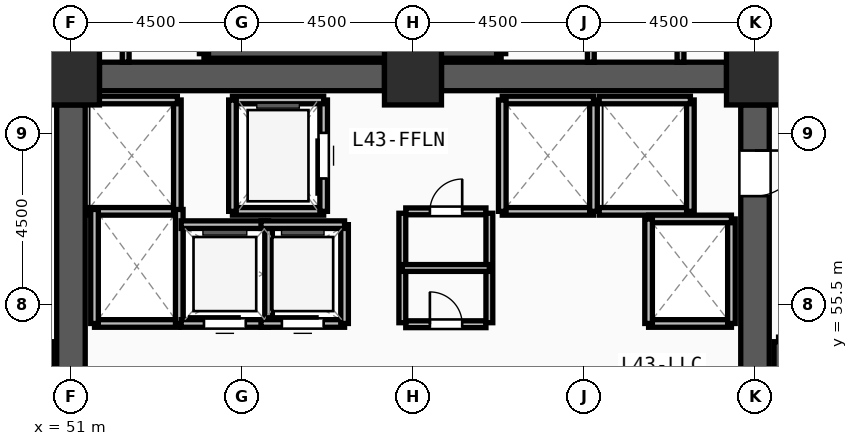
"""IFC4 building model, lengths in metres.
Left out: names, types, materials, properties, quantities, classifications, styles, units other than length and angle.
Written with IfcOpenShell. Run it as: python <this file> out.ifc"""

import sys

from ifc_helpers import new_model, si_unit, direction, frame, frame_2d, origin, origin_2d, place, context, subcontext, project, spatial, rectangle, extrude, source, transform, mapped, element, fill, save


model = new_model("IFC4")
c1 = context("Model", 3, precision=1e-05, world=origin(), true_north=direction((0.0, 1.0)))
c2 = subcontext(c1, "Body", "Model", "MODEL_VIEW")
j1 = project(units=[si_unit("LENGTHUNIT", "METRE"), si_unit("PLANEANGLEUNIT", "RADIAN")], contexts=[c1])
p1 = place(None, origin())
s1 = spatial("IfcSite", under=j1, at=p1, CompositionType="ELEMENT")
p2 = place(p1, origin())
s2 = spatial("IfcBuilding", under=s1, at=p2, CompositionType="ELEMENT")
p3 = place(p2, frame((0.0, 0.0, 166.5)))
s3 = spatial("IfcBuildingStorey", under=s2, at=p3, CompositionType="ELEMENT", Elevation=166.5)
m1 = source(origin(), c2, "Body", "SweptSolid", [
    extrude(rectangle(XDim=1.5, YDim=1.5, at=origin_2d()), origin(), (0.0, 0.0, 1.0), 3.75),
])
for number, where, z_axis, x_axis in (
    (1, (69.0, 61.5, 0.0), (0.0, 0.0, 1.0), (1.0, 0.0, 0.0)),
    (2, (60.0, 61.5, 0.0), (0.0, 0.0, 1.0), (1.0, 0.0, 0.0)),
    (3, (51.0, 61.5, 0.0), (0.0, 0.0, 1.0), (1.0, 0.0, 0.0)),
):
    element("IfcColumn", number, at=place(p3, frame(where, z_axis=z_axis, x_axis=x_axis)), inside=s3, PredefinedType="COLUMN", context=c2, shape_type="MappedRepresentation", body=[
        mapped(m1, transform((0.0, 0.0, 0.0), x_axis=(1.0, 0.0, 0.0), y_axis=(0.0, 1.0, 0.0), z_axis=(0.0, 0.0, 1.0), scale=1.0)),
    ])
for number, where, z_axis, x_axis in (
    (4, (51.75, 61.5, 0.0), (0.0, 0.0, 1.0), (1.0, 0.0, 0.0)),
    (5, (60.75, 61.5, 0.0), (0.0, 0.0, 1.0), (1.0, 0.0, 0.0)),
):
    element("IfcWall", number, at=place(p3, frame(where, z_axis=z_axis, x_axis=x_axis)), inside=s3, PredefinedType="SHEAR", context=c2, shape_type="SweptSolid", body=[
        extrude(rectangle(XDim=7.5, YDim=0.75, at=frame_2d((3.75, 0.0))), origin(), (0.0, 0.0, 1.0), 3.57),
    ])
p4 = place(p3, frame((69.0, 60.75, 0.0), z_axis=(0.0, 0.0, 1.0), x_axis=(0.0, -1.0, 0.0)))
e6 = element("IfcWall", 6, at=p4, inside=s3, PredefinedType="SHEAR", context=c2, shape_type="SweptSolid", body=[
    extrude(rectangle(XDim=13.5, YDim=0.75, at=frame_2d((6.75, 0.0))), origin(), (0.0, 0.0, 1.0), 3.57),
])
m2 = source(origin(), c2, "Body", "SweptSolid", [
    extrude(rectangle(XDim=1.2, YDim=2.2, at=frame_2d((0.6, 1.1))), frame((0.0, 0.385, 0.0), z_axis=(0.0, -1.0, 0.0), x_axis=(1.0, 0.0, 0.0)), (0.0, 0.0, 1.0), 0.77),
])
p5 = place(p4, frame((1.2, 0.0, 0.0)))
e7 = element("IfcOpeningElement", 7, at=p5, cuts=e6, PredefinedType="OPENING", context=c2, shape_type="MappedRepresentation", body=[
    mapped(m2, transform((0.0, 0.0, 0.0), x_axis=(1.0, 0.0, 0.0), y_axis=(0.0, 1.0, 0.0), z_axis=(0.0, 0.0, 1.0), scale=1.0)),
])
p6 = place(p3, frame((51.0, 47.25, 0.0), z_axis=(0.0, 0.0, 1.0), x_axis=(0.0, 1.0, 0.0)))
e8 = element("IfcWall", 8, at=p6, inside=s3, PredefinedType="SHEAR", context=c2, shape_type="SweptSolid", body=[
    extrude(rectangle(XDim=13.5, YDim=0.75, at=frame_2d((6.75, 0.0))), origin(), (0.0, 0.0, 1.0), 3.57),
])
for number, where, z_axis, x_axis in (
    (9, (69.62, 54.52, 0.0), (0.0, 0.0, 1.0), (0.0, -1.0, 0.0)),
    (10, (54.5, 62.1, 0.0), (0.0, 0.0, 1.0), (1.0, 0.0, 0.0)),
):
    element("IfcWall", number, at=place(p3, frame(where, z_axis=z_axis, x_axis=x_axis)), inside=s3, PredefinedType="SOLIDWALL", context=c2, shape_type="SweptSolid", body=[
        extrude(rectangle(XDim=7.82, YDim=0.24, at=frame_2d((3.91, 0.0))), origin(), (0.0, 0.0, 1.0), 3.57),
    ])
for number, where, z_axis, x_axis in (
    (11, (62.32, 62.1, 0.0), (0.0, 0.0, 1.0), (0.0, 1.0, 0.0)),
    (12, (54.5, 65.54, 0.0), (0.0, 0.0, 1.0), (0.0, -1.0, 0.0)),
):
    element("IfcWall", number, at=place(p3, frame(where, z_axis=z_axis, x_axis=x_axis)), inside=s3, PredefinedType="SOLIDWALL", context=c2, shape_type="SweptSolid", body=[
        extrude(rectangle(XDim=3.44, YDim=0.24, at=frame_2d((1.72, 0.0))), origin(), (0.0, 0.0, 1.0), 3.57),
    ])
p7 = place(p3, frame((55.25, 57.95, 0.0), z_axis=(0.0, 0.0, 1.0), x_axis=(1.0, 0.0, 0.0)))
e13 = element("IfcWall", 13, at=p7, inside=s3, PredefinedType="SOLIDWALL", context=c2, shape_type="SweptSolid", body=[
    extrude(rectangle(XDim=2.4, YDim=0.2, at=frame_2d((1.2, 0.0))), origin(), (0.0, 0.0, 1.0), 3.57),
])
p8 = place(p3, frame((57.65, 57.95, 0.0), z_axis=(0.0, 0.0, 1.0), x_axis=(0.0, 1.0, 0.0)))
e14 = element("IfcWall", 14, at=p8, inside=s3, PredefinedType="SOLIDWALL", context=c2, shape_type="SweptSolid", body=[
    extrude(rectangle(XDim=2.93, YDim=0.2, at=frame_2d((1.465, 0.0))), origin(), (0.0, 0.0, 1.0), 3.57),
])
m3 = source(origin(), c2, "Body", "SweptSolid", [
    extrude(rectangle(XDim=1.2, YDim=2.3, at=frame_2d((0.6, 1.15))), frame((0.0, 0.11, 0.0), z_axis=(0.0, -1.0, 0.0), x_axis=(1.0, 0.0, 0.0)), (0.0, 0.0, 1.0), 0.22),
])
p9 = place(p8, frame((0.865, 0.0, 0.0)))
e15 = element("IfcOpeningElement", 15, at=p9, cuts=e14, PredefinedType="OPENING", context=c2, shape_type="MappedRepresentation", body=[
    mapped(m3, transform((0.0, 0.0, 0.0), x_axis=(1.0, 0.0, 0.0), y_axis=(0.0, 1.0, 0.0), z_axis=(0.0, 0.0, 1.0), scale=1.0)),
])
p10 = place(p3, frame((57.65, 60.88, 0.0), z_axis=(0.0, 0.0, 1.0), x_axis=(-1.0, 0.0, 0.0)))
e16 = element("IfcWall", 16, at=p10, inside=s3, PredefinedType="SOLIDWALL", context=c2, shape_type="SweptSolid", body=[
    extrude(rectangle(XDim=2.4, YDim=0.2, at=frame_2d((1.2, 0.0))), origin(), (0.0, 0.0, 1.0), 3.57),
])
p11 = place(p3, frame((55.25, 60.88, 0.0), z_axis=(0.0, 0.0, 1.0), x_axis=(0.0, -1.0, 0.0)))
e17 = element("IfcWall", 17, at=p11, inside=s3, PredefinedType="SOLIDWALL", context=c2, shape_type="SweptSolid", body=[
    extrude(rectangle(XDim=2.93, YDim=0.2, at=frame_2d((1.465, 0.0))), origin(), (0.0, 0.0, 1.0), 3.57),
])
p12 = place(p3, frame((62.35, 57.95, 0.0), z_axis=(0.0, 0.0, 1.0), x_axis=(1.0, 0.0, 0.0)))
e18 = element("IfcWall", 18, at=p12, inside=s3, PredefinedType="SOLIDWALL", context=c2, shape_type="SweptSolid", body=[
    extrude(rectangle(XDim=2.4, YDim=0.2, at=frame_2d((1.2, 0.0))), origin(), (0.0, 0.0, 1.0), 3.57),
])
p13 = place(p3, frame((64.75, 57.95, 0.0), z_axis=(0.0, 0.0, 1.0), x_axis=(0.0, 1.0, 0.0)))
e19 = element("IfcWall", 19, at=p13, inside=s3, PredefinedType="SOLIDWALL", context=c2, shape_type="SweptSolid", body=[
    extrude(rectangle(XDim=2.93, YDim=0.2, at=frame_2d((1.465, 0.0))), origin(), (0.0, 0.0, 1.0), 3.57),
])
p14 = place(p3, frame((64.75, 60.88, 0.0), z_axis=(0.0, 0.0, 1.0), x_axis=(-1.0, 0.0, 0.0)))
e20 = element("IfcWall", 20, at=p14, inside=s3, PredefinedType="SOLIDWALL", context=c2, shape_type="SweptSolid", body=[
    extrude(rectangle(XDim=2.4, YDim=0.2, at=frame_2d((1.2, 0.0))), origin(), (0.0, 0.0, 1.0), 3.57),
])
p15 = place(p3, frame((62.35, 60.88, 0.0), z_axis=(0.0, 0.0, 1.0), x_axis=(0.0, -1.0, 0.0)))
e21 = element("IfcWall", 21, at=p15, inside=s3, PredefinedType="SOLIDWALL", context=c2, shape_type="SweptSolid", body=[
    extrude(rectangle(XDim=2.93, YDim=0.2, at=frame_2d((1.465, 0.0))), origin(), (0.0, 0.0, 1.0), 3.57),
])
p16 = place(p3, frame((64.9, 57.95, 0.0), z_axis=(0.0, 0.0, 1.0), x_axis=(1.0, 0.0, 0.0)))
e22 = element("IfcWall", 22, at=p16, inside=s3, PredefinedType="SOLIDWALL", context=c2, shape_type="SweptSolid", body=[
    extrude(rectangle(XDim=2.4, YDim=0.2, at=frame_2d((1.2, 0.0))), origin(), (0.0, 0.0, 1.0), 3.57),
])
p17 = place(p3, frame((67.3, 57.95, 0.0), z_axis=(0.0, 0.0, 1.0), x_axis=(0.0, 1.0, 0.0)))
e23 = element("IfcWall", 23, at=p17, inside=s3, PredefinedType="SOLIDWALL", context=c2, shape_type="SweptSolid", body=[
    extrude(rectangle(XDim=2.93, YDim=0.2, at=frame_2d((1.465, 0.0))), origin(), (0.0, 0.0, 1.0), 3.57),
])
for number, where, z_axis, x_axis in (
    (24, (67.3, 60.88, 0.0), (0.0, 0.0, 1.0), (-1.0, 0.0, 0.0)),
    (25, (51.4, 57.95, 0.0), (0.0, 0.0, 1.0), (1.0, 0.0, 0.0)),
):
    element("IfcWall", number, at=place(p3, frame(where, z_axis=z_axis, x_axis=x_axis)), inside=s3, PredefinedType="SOLIDWALL", context=c2, shape_type="SweptSolid", body=[
        extrude(rectangle(XDim=2.4, YDim=0.2, at=frame_2d((1.2, 0.0))), origin(), (0.0, 0.0, 1.0), 3.57),
    ])
p18 = place(p3, frame((53.8, 57.95, 0.0), z_axis=(0.0, 0.0, 1.0), x_axis=(0.0, 1.0, 0.0)))
e26 = element("IfcWall", 26, at=p18, inside=s3, PredefinedType="SOLIDWALL", context=c2, shape_type="SweptSolid", body=[
    extrude(rectangle(XDim=2.93, YDim=0.2, at=frame_2d((1.465, 0.0))), origin(), (0.0, 0.0, 1.0), 3.57),
])
p19 = place(p3, frame((53.8, 60.88, 0.0), z_axis=(0.0, 0.0, 1.0), x_axis=(-1.0, 0.0, 0.0)))
e27 = element("IfcWall", 27, at=p19, inside=s3, PredefinedType="SOLIDWALL", context=c2, shape_type="SweptSolid", body=[
    extrude(rectangle(XDim=2.4, YDim=0.2, at=frame_2d((1.2, 0.0))), origin(), (0.0, 0.0, 1.0), 3.57),
])
p20 = place(p3, frame((51.62, 55.0, 0.0), z_axis=(0.0, 0.0, 1.0), x_axis=(1.0, 0.0, 0.0)))
e28 = element("IfcWall", 28, at=p20, inside=s3, PredefinedType="SOLIDWALL", context=c2, shape_type="SweptSolid", body=[
    extrude(rectangle(XDim=2.23, YDim=0.2, at=frame_2d((1.115, 0.0))), origin(), (0.0, 0.0, 1.0), 3.57),
])
for number, where, z_axis, x_axis in (
    (29, (53.85, 55.0, 0.0), (0.0, 0.0, 1.0), (0.0, 1.0, 0.0)),
    (30, (51.62, 58.0, 0.0), (0.0, 0.0, 1.0), (0.0, -1.0, 0.0)),
):
    element("IfcWall", number, at=place(p3, frame(where, z_axis=z_axis, x_axis=x_axis)), inside=s3, PredefinedType="SOLIDWALL", context=c2, shape_type="SweptSolid", body=[
        extrude(rectangle(XDim=3.0, YDim=0.2, at=frame_2d((1.5, 0.0))), origin(), (0.0, 0.0, 1.0), 3.57),
    ])
p21 = place(p3, frame((66.2, 55.0, 0.0), z_axis=(0.0, 0.0, 1.0), x_axis=(1.0, 0.0, 0.0)))
e31 = element("IfcWall", 31, at=p21, inside=s3, PredefinedType="SOLIDWALL", context=c2, shape_type="SweptSolid", body=[
    extrude(rectangle(XDim=2.18, YDim=0.2, at=frame_2d((1.09, 0.0))), origin(), (0.0, 0.0, 1.0), 3.57),
])
p22 = place(p3, frame((68.38, 55.0, 0.0), z_axis=(0.0, 0.0, 1.0), x_axis=(0.0, 1.0, 0.0)))
e32 = element("IfcWall", 32, at=p22, inside=s3, PredefinedType="SOLIDWALL", context=c2, shape_type="SweptSolid", body=[
    extrude(rectangle(XDim=2.75, YDim=0.2, at=frame_2d((1.375, 0.0))), origin(), (0.0, 0.0, 1.0), 3.57),
])
p23 = place(p3, frame((68.38, 57.75, 0.0), z_axis=(0.0, 0.0, 1.0), x_axis=(-1.0, 0.0, 0.0)))
e33 = element("IfcWall", 33, at=p23, inside=s3, PredefinedType="SOLIDWALL", context=c2, shape_type="SweptSolid", body=[
    extrude(rectangle(XDim=2.18, YDim=0.2, at=frame_2d((1.09, 0.0))), origin(), (0.0, 0.0, 1.0), 3.57),
])
p24 = place(p3, frame((66.2, 57.75, 0.0), z_axis=(0.0, 0.0, 1.0), x_axis=(0.0, -1.0, 0.0)))
e34 = element("IfcWall", 34, at=p24, inside=s3, PredefinedType="SOLIDWALL", context=c2, shape_type="SweptSolid", body=[
    extrude(rectangle(XDim=2.75, YDim=0.2, at=frame_2d((1.375, 0.0))), origin(), (0.0, 0.0, 1.0), 3.57),
])
p25 = place(p3, frame((53.9, 55.0, 0.0), z_axis=(0.0, 0.0, 1.0), x_axis=(1.0, 0.0, 0.0)))
e35 = element("IfcWall", 35, at=p25, inside=s3, PredefinedType="SOLIDWALL", context=c2, shape_type="SweptSolid", body=[
    extrude(rectangle(XDim=2.3, YDim=0.2, at=frame_2d((1.15, 0.0))), origin(), (0.0, 0.0, 1.0), 3.57),
])
m4 = source(origin(), c2, "Body", "SweptSolid", [
    extrude(rectangle(XDim=1.1, YDim=2.2, at=frame_2d((0.55, 1.1))), frame((0.0, 0.11, 0.0), z_axis=(0.0, -1.0, 0.0), x_axis=(1.0, 0.0, 0.0)), (0.0, 0.0, 1.0), 0.22),
])
p26 = place(p25, frame((0.6, 0.0, 0.0)))
e36 = element("IfcOpeningElement", 36, at=p26, cuts=e35, PredefinedType="OPENING", context=c2, shape_type="MappedRepresentation", body=[
    mapped(m4, transform((0.0, 0.0, 0.0), x_axis=(1.0, 0.0, 0.0), y_axis=(0.0, 1.0, 0.0), z_axis=(0.0, 0.0, 1.0), scale=1.0)),
])
p27 = place(p3, frame((56.2, 55.0, 0.0), z_axis=(0.0, 0.0, 1.0), x_axis=(0.0, 1.0, 0.0)))
e37 = element("IfcWall", 37, at=p27, inside=s3, PredefinedType="SOLIDWALL", context=c2, shape_type="SweptSolid", body=[
    extrude(rectangle(XDim=2.6, YDim=0.2, at=frame_2d((1.3, 0.0))), origin(), (0.0, 0.0, 1.0), 3.57),
])
p28 = place(p3, frame((56.2, 57.6, 0.0), z_axis=(0.0, 0.0, 1.0), x_axis=(-1.0, 0.0, 0.0)))
e38 = element("IfcWall", 38, at=p28, inside=s3, PredefinedType="SOLIDWALL", context=c2, shape_type="SweptSolid", body=[
    extrude(rectangle(XDim=2.3, YDim=0.2, at=frame_2d((1.15, 0.0))), origin(), (0.0, 0.0, 1.0), 3.57),
])
p29 = place(p3, frame((56.0, 55.0, 0.0), z_axis=(0.0, 0.0, 1.0), x_axis=(1.0, 0.0, 0.0)))
e39 = element("IfcWall", 39, at=p29, inside=s3, PredefinedType="SOLIDWALL", context=c2, shape_type="SweptSolid", body=[
    extrude(rectangle(XDim=2.2, YDim=0.2, at=frame_2d((1.1, 0.0))), origin(), (0.0, 0.0, 1.0), 3.57),
])
p30 = place(p29, frame((0.55, 0.0, 0.0)))
e40 = element("IfcOpeningElement", 40, at=p30, cuts=e39, PredefinedType="OPENING", context=c2, shape_type="MappedRepresentation", body=[
    mapped(m4, transform((0.0, 0.0, 0.0), x_axis=(1.0, 0.0, 0.0), y_axis=(0.0, 1.0, 0.0), z_axis=(0.0, 0.0, 1.0), scale=1.0)),
])
p31 = place(p3, frame((58.2, 55.0, 0.0), z_axis=(0.0, 0.0, 1.0), x_axis=(0.0, 1.0, 0.0)))
e41 = element("IfcWall", 41, at=p31, inside=s3, PredefinedType="SOLIDWALL", context=c2, shape_type="SweptSolid", body=[
    extrude(rectangle(XDim=2.6, YDim=0.2, at=frame_2d((1.3, 0.0))), origin(), (0.0, 0.0, 1.0), 3.57),
])
p32 = place(p3, frame((58.2, 57.6, 0.0), z_axis=(0.0, 0.0, 1.0), x_axis=(-1.0, 0.0, 0.0)))
e42 = element("IfcWall", 42, at=p32, inside=s3, PredefinedType="SOLIDWALL", context=c2, shape_type="SweptSolid", body=[
    extrude(rectangle(XDim=2.2, YDim=0.2, at=frame_2d((1.1, 0.0))), origin(), (0.0, 0.0, 1.0), 3.57),
])
p33 = place(p3, frame((59.81, 54.98, 0.0), z_axis=(0.0, 0.0, 1.0), x_axis=(1.0, 0.0, 0.0)))
e43 = element("IfcWall", 43, at=p33, inside=s3, PredefinedType="PARTITIONING", context=c2, shape_type="SweptSolid", body=[
    extrude(rectangle(XDim=2.11, YDim=0.18, at=frame_2d((1.055, 0.0))), origin(), (0.0, 0.0, 1.0), 3.57),
])
m5 = source(origin(), c2, "Body", "SweptSolid", [
    extrude(rectangle(XDim=0.85, YDim=2.1, at=frame_2d((0.425, 1.05))), frame((0.0, 0.1, 0.0), z_axis=(0.0, -1.0, 0.0), x_axis=(1.0, 0.0, 0.0)), (0.0, 0.0, 1.0), 0.2),
])
p34 = place(p33, frame((0.635, 0.0, 0.0)))
e44 = element("IfcOpeningElement", 44, at=p34, cuts=e43, PredefinedType="OPENING", context=c2, shape_type="MappedRepresentation", body=[
    mapped(m5, transform((0.0, 0.0, 0.0), x_axis=(1.0, 0.0, 0.0), y_axis=(0.0, 1.0, 0.0), z_axis=(0.0, 0.0, 1.0), scale=1.0)),
])
p35 = place(p3, frame((59.81, 57.95, 0.0), z_axis=(0.0, 0.0, 1.0), x_axis=(1.0, 0.0, 0.0)))
e45 = element("IfcWall", 45, at=p35, inside=s3, PredefinedType="PARTITIONING", context=c2, shape_type="SweptSolid", body=[
    extrude(rectangle(XDim=2.11, YDim=0.18, at=frame_2d((1.055, 0.0))), origin(), (0.0, 0.0, 1.0), 3.57),
])
p36 = place(p35, frame((0.635, 0.0, 0.0)))
e46 = element("IfcOpeningElement", 46, at=p36, cuts=e45, PredefinedType="OPENING", context=c2, shape_type="MappedRepresentation", body=[
    mapped(m5, transform((0.0, 0.0, 0.0), x_axis=(1.0, 0.0, 0.0), y_axis=(0.0, 1.0, 0.0), z_axis=(0.0, 0.0, 1.0), scale=1.0)),
])
for number, where, z_axis, x_axis in (
    (47, (59.72, 55.02, 0.0), (0.0, 0.0, 1.0), (0.0, 1.0, 0.0)),
    (48, (62.01, 55.02, 0.0), (0.0, 0.0, 1.0), (0.0, 1.0, 0.0)),
):
    element("IfcWall", number, at=place(p3, frame(where, z_axis=z_axis, x_axis=x_axis)), inside=s3, PredefinedType="PARTITIONING", context=c2, shape_type="SweptSolid", body=[
        extrude(rectangle(XDim=2.88, YDim=0.18, at=frame_2d((1.44, 0.0))), origin(), (0.0, 0.0, 1.0), 3.57),
    ])
p37 = place(p3, frame((59.72, 56.46, 0.0), z_axis=(0.0, 0.0, 1.0), x_axis=(1.0, 0.0, 0.0)))
e49 = element("IfcWall", 49, at=p37, inside=s3, PredefinedType="PARTITIONING", context=c2, shape_type="SweptSolid", body=[
    extrude(rectangle(XDim=2.29, YDim=0.18, at=frame_2d((1.145, 0.0))), origin(), (0.0, 0.0, 1.0), 3.57),
])
p38 = place(p3, frame((50.54, 61.95, 0.0), z_axis=(0.0, 0.0, 1.0), x_axis=(0.0, 1.0, 0.0)))
e50 = element("IfcWall", 50, at=p38, inside=s3, PredefinedType="PARTITIONING", context=c2, shape_type="SweptSolid", body=[
    extrude(rectangle(XDim=3.63, YDim=0.18, at=frame_2d((1.815, 0.0))), origin(), (0.0, 0.0, 1.0), 3.57),
])
for number, where, z_axis, x_axis in (
    (51, (52.44, 61.875, 0.0), (0.0, 0.0, 1.0), (0.0, 1.0, 0.0)),
    (52, (64.68, 61.875, 0.0), (0.0, 0.0, 1.0), (0.0, 1.0, 0.0)),
    (53, (67.04, 61.875, 0.0), (0.0, 0.0, 1.0), (0.0, 1.0, 0.0)),
):
    element("IfcWall", number, at=place(p3, frame(where, z_axis=z_axis, x_axis=x_axis)), inside=s3, PredefinedType="PARTITIONING", context=c2, shape_type="SweptSolid", body=[
        extrude(rectangle(XDim=3.705, YDim=0.18, at=frame_2d((1.853, 0.0))), origin(), (0.0, 0.0, 1.0), 3.57),
    ])
p39 = place(p3, frame((69.46, 61.95, 0.0), z_axis=(0.0, 0.0, 1.0), x_axis=(0.0, 1.0, 0.0)))
e54 = element("IfcWall", 54, at=p39, inside=s3, PredefinedType="PARTITIONING", context=c2, shape_type="SweptSolid", body=[
    extrude(rectangle(XDim=3.63, YDim=0.18, at=frame_2d((1.815, 0.0))), origin(), (0.0, 0.0, 1.0), 3.57),
])
m6 = source(origin(), c2, "Body", "SweptSolid", [
    extrude(rectangle(XDim=1.2, YDim=2.2, at=frame_2d((0.6, 1.1))), frame((0.0, 0.025, 0.0), z_axis=(0.0, -1.0, 0.0), x_axis=(1.0, 0.0, 0.0)), (0.0, 0.0, 1.0), 0.05),
])
p40 = place(p5, origin())
e55 = element("IfcDoor", 55, at=p40, inside=s3, OperationType="SINGLE_SWING_LEFT", PredefinedType="DOOR", context=c2, shape_type="MappedRepresentation", body=[
    mapped(m6, transform((0.0, 0.0, 0.0), x_axis=(1.0, 0.0, 0.0), y_axis=(0.0, 1.0, 0.0), z_axis=(0.0, 0.0, 1.0), scale=1.0)),
])
fill(e7, e55)
m7 = source(origin(), c2, "Body", "SweptSolid", [
    extrude(rectangle(XDim=1.2, YDim=2.3, at=frame_2d((0.6, 1.15))), frame((0.0, 0.025, 0.0), z_axis=(0.0, -1.0, 0.0), x_axis=(1.0, 0.0, 0.0)), (0.0, 0.0, 1.0), 0.05),
])
p41 = place(p9, origin())
e56 = element("IfcDoor", 56, at=p41, inside=s3, OperationType="SLIDING_TO_LEFT", PredefinedType="DOOR", context=c2, shape_type="MappedRepresentation", body=[
    mapped(m7, transform((0.0, 0.0, 0.0), x_axis=(1.0, 0.0, 0.0), y_axis=(0.0, 1.0, 0.0), z_axis=(0.0, 0.0, 1.0), scale=1.0)),
])
fill(e15, e56)
m8 = source(origin(), c2, "Body", "SweptSolid", [
    extrude(rectangle(XDim=1.1, YDim=2.2, at=frame_2d((0.55, 1.1))), frame((0.0, 0.025, 0.0), z_axis=(0.0, -1.0, 0.0), x_axis=(1.0, 0.0, 0.0)), (0.0, 0.0, 1.0), 0.05),
])
p42 = place(p26, origin())
e57 = element("IfcDoor", 57, at=p42, inside=s3, OperationType="SLIDING_TO_LEFT", PredefinedType="DOOR", context=c2, shape_type="MappedRepresentation", body=[
    mapped(m8, transform((0.0, 0.0, 0.0), x_axis=(1.0, 0.0, 0.0), y_axis=(0.0, 1.0, 0.0), z_axis=(0.0, 0.0, 1.0), scale=1.0)),
])
fill(e36, e57)
p43 = place(p30, origin())
e58 = element("IfcDoor", 58, at=p43, inside=s3, OperationType="SLIDING_TO_LEFT", PredefinedType="DOOR", context=c2, shape_type="MappedRepresentation", body=[
    mapped(m8, transform((0.0, 0.0, 0.0), x_axis=(1.0, 0.0, 0.0), y_axis=(0.0, 1.0, 0.0), z_axis=(0.0, 0.0, 1.0), scale=1.0)),
])
fill(e40, e58)
m9 = source(origin(), c2, "Body", "SweptSolid", [
    extrude(rectangle(XDim=0.85, YDim=2.1, at=frame_2d((0.425, 1.05))), frame((0.0, 0.025, 0.0), z_axis=(0.0, -1.0, 0.0), x_axis=(1.0, 0.0, 0.0)), (0.0, 0.0, 1.0), 0.05),
])
p44 = place(p34, origin())
e59 = element("IfcDoor", 59, at=p44, inside=s3, OperationType="SINGLE_SWING_LEFT", PredefinedType="DOOR", context=c2, shape_type="MappedRepresentation", body=[
    mapped(m9, transform((0.0, 0.0, 0.0), x_axis=(1.0, 0.0, 0.0), y_axis=(0.0, 1.0, 0.0), z_axis=(0.0, 0.0, 1.0), scale=1.0)),
])
fill(e44, e59)
p45 = place(p36, origin())
e60 = element("IfcDoor", 60, at=p45, inside=s3, OperationType="SINGLE_SWING_RIGHT", PredefinedType="DOOR", context=c2, shape_type="MappedRepresentation", body=[
    mapped(m9, transform((0.0, 0.0, 0.0), x_axis=(1.0, 0.0, 0.0), y_axis=(0.0, 1.0, 0.0), z_axis=(0.0, 0.0, 1.0), scale=1.0)),
])
fill(e46, e60)
save(model, sys.argv[1])
